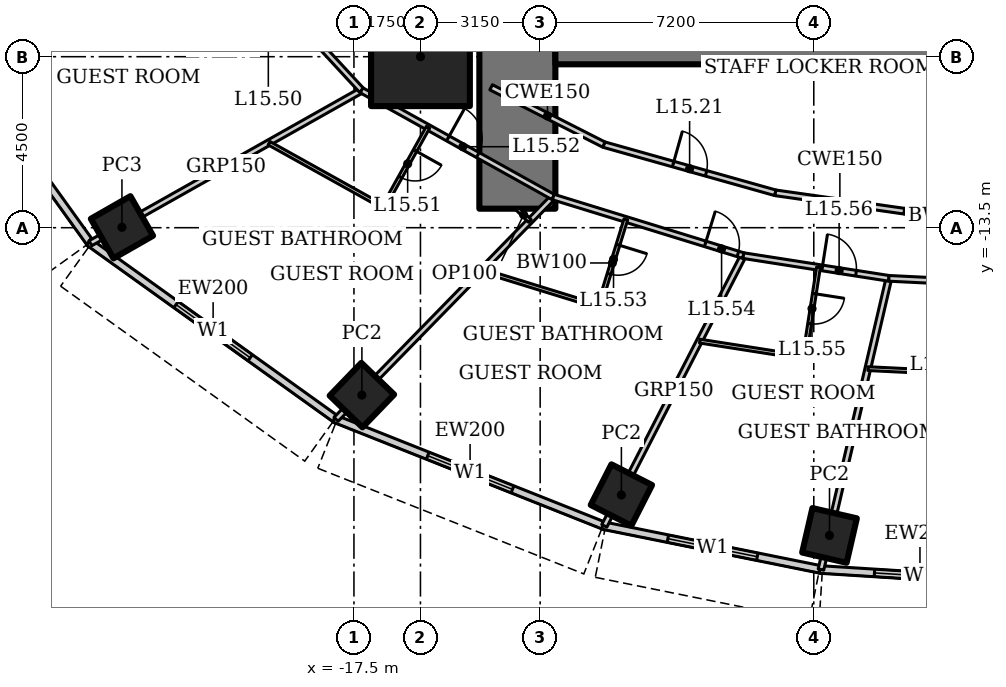
"""IFC4 building model, lengths in metres.
Left out: names, types, materials, properties, quantities, classifications, styles, units other than length and angle.
Written with IfcOpenShell. Run it as: python <this file> out.ifc"""

import sys

from ifc_helpers import new_model, si_unit, direction, frame, frame_2d, origin, origin_2d, place, context, subcontext, project, spatial, rectangle, hollow_rectangle, extrude, element, fill, save


model = new_model("IFC4")
c1 = context("Model", 3, precision=1e-05, world=origin(), true_north=direction((0.0, 1.0)))
c2 = subcontext(c1, "Body", "Model", "MODEL_VIEW")
j1 = project(units=[si_unit("LENGTHUNIT", "METRE"), si_unit("PLANEANGLEUNIT", "RADIAN")], contexts=[c1])
p1 = place(None, origin())
s1 = spatial("IfcSite", under=j1, at=p1, CompositionType="ELEMENT")
p2 = place(p1, origin())
s2 = spatial("IfcBuilding", under=s1, at=p2, CompositionType="ELEMENT")
p3 = place(p2, frame((0.0, 0.0, 69.4)))
s3 = spatial("IfcBuildingStorey", under=s2, at=p3, CompositionType="ELEMENT", Elevation=69.4)
p4 = place(p3, frame((-15.75, -9.0, 0.0), z_axis=(0.0, 0.0, 1.0), x_axis=(1.0, 0.0, 0.0)))
e1 = element("IfcColumn", 1, at=p4, inside=s3, PredefinedType="COLUMN", context=c2, shape_type="SweptSolid", body=[
    extrude(hollow_rectangle(XDim=2.6, YDim=2.6, WallThickness=0.13, at=origin_2d()), origin(), (0.0, 0.0, 1.0), 3.6),
])
p5 = place(p3, frame((-23.605, -13.489, 0.0), z_axis=(0.0, 0.0, 1.0), x_axis=(0.86824298017, 0.496139221777, 0.0)))
e2 = element("IfcColumn", 2, at=p5, inside=s3, PredefinedType="COLUMN", context=c2, shape_type="SweptSolid", body=[
    extrude(hollow_rectangle(XDim=1.2, YDim=1.2, WallThickness=0.12, at=origin_2d()), origin(), (0.0, 0.0, 1.0), 3.6),
])
for number, where, z_axis, x_axis in (
    (3, (-17.291, -17.905, 0.0), (0.0, 0.0, 1.0), (0.695, 0.719, 0.0)),
    (4, (-10.463, -20.534, 0.0), (0.0, 0.0, 1.0), (0.454, 0.891, 0.0)),
    (5, (-4.986, -21.598, 0.0), (0.0, 0.0, 1.0), (0.225, 0.974, 0.0)),
):
    element("IfcColumn", number, at=place(p3, frame(where, z_axis=z_axis, x_axis=x_axis)), inside=s3, PredefinedType="COLUMN", context=c2, shape_type="SweptSolid", body=[
        extrude(hollow_rectangle(XDim=1.2, YDim=1.2, WallThickness=0.1, at=origin_2d()), origin(), (0.0, 0.0, 1.0), 3.6),
    ])
p6 = place(p3, frame((-13.2, 13.0, 0.0), z_axis=(0.0, 0.0, 1.0), x_axis=(0.0, -1.0, 0.0)))
e6 = element("IfcWall", 6, at=p6, inside=s3, PredefinedType="SHEAR", context=c2, shape_type="SweptSolid", body=[
    extrude(rectangle(XDim=26.0, YDim=2.0, at=frame_2d((13.0, 0.0))), origin(), (0.0, 0.0, 1.0), 3.6),
])
p7 = place(p6, frame((12.1, 0.0, 0.0)))
e7 = element("IfcOpeningElement", 7, at=p7, cuts=e6, PredefinedType="OPENING", context=c2, shape_type="SweptSolid", body=[
    extrude(rectangle(XDim=1.8, YDim=2.1, at=frame_2d((0.9, 1.05))), frame((0.0, 1.01, 0.0), z_axis=(0.0, -1.0, 0.0), x_axis=(1.0, 0.0, 0.0)), (0.0, 0.0, 1.0), 2.02),
])
p8 = place(p3, frame((-12.2, -8.0, 0.0), z_axis=(0.0, 0.0, 1.0), x_axis=(1.0, 0.0, 0.0)))
e8 = element("IfcWall", 8, at=p8, inside=s3, PredefinedType="SHEAR", context=c2, shape_type="SweptSolid", body=[
    extrude(rectangle(XDim=24.4, YDim=2.4, at=frame_2d((12.2, 0.0))), origin(), (0.0, 0.0, 1.0), 3.6),
])
p9 = place(p3, frame((-29.26, -7.2, 0.0), z_axis=(0.0, 0.0, 1.0), x_axis=(0.583937613703, -0.811798536155, 0.0)))
e9 = element("IfcWall", 9, at=p9, inside=s3, PredefinedType="SOLIDWALL", context=c2, shape_type="SweptSolid", body=[
    extrude(rectangle(XDim=8.323, YDim=0.2, at=frame_2d((4.162, 0.0))), origin(), (0.0, 0.0, 1.0), 3.45),
])
p10 = place(p9, frame((2.961, 0.0, 0.5)))
e10 = element("IfcOpeningElement", 10, at=p10, cuts=e9, PredefinedType="OPENING", context=c2, shape_type="SweptSolid", body=[
    extrude(rectangle(XDim=2.4, YDim=2.2, at=frame_2d((1.2, 1.1))), frame((0.0, 0.11, 0.0), z_axis=(0.0, -1.0, 0.0), x_axis=(1.0, 0.0, 0.0)), (0.0, 0.0, 1.0), 0.22),
])
p11 = place(p3, frame((-24.482, -13.875, 0.0), z_axis=(0.0, 0.0, 1.0), x_axis=(0.812791321576, -0.582554948112, 0.0)))
e11 = element("IfcWall", 11, at=p11, inside=s3, PredefinedType="SOLIDWALL", context=c2, shape_type="SweptSolid", body=[
    extrude(rectangle(XDim=8.063, YDim=0.2, at=frame_2d((4.032, 0.0))), origin(), (0.0, 0.0, 1.0), 3.45),
])
p12 = place(p11, frame((2.832, 0.0, 0.5)))
e12 = element("IfcOpeningElement", 12, at=p12, cuts=e11, PredefinedType="OPENING", context=c2, shape_type="SweptSolid", body=[
    extrude(rectangle(XDim=2.4, YDim=2.2, at=frame_2d((1.2, 1.1))), frame((0.0, 0.11, 0.0), z_axis=(0.0, -1.0, 0.0), x_axis=(1.0, 0.0, 0.0)), (0.0, 0.0, 1.0), 0.22),
])
p13 = place(p3, frame((-18.018, -18.523, 0.0), z_axis=(0.0, 0.0, 1.0), x_axis=(0.929358351251, -0.369178892895, 0.0)))
e13 = element("IfcWall", 13, at=p13, inside=s3, PredefinedType="SOLIDWALL", context=c2, shape_type="SweptSolid", body=[
    extrude(rectangle(XDim=7.692, YDim=0.2, at=frame_2d((3.846, 0.0))), origin(), (0.0, 0.0, 1.0), 3.45),
])
p14 = place(p13, frame((2.646, 0.0, 0.5)))
e14 = element("IfcOpeningElement", 14, at=p14, cuts=e13, PredefinedType="OPENING", context=c2, shape_type="SweptSolid", body=[
    extrude(rectangle(XDim=2.4, YDim=2.2, at=frame_2d((1.2, 1.1))), frame((0.0, 0.11, 0.0), z_axis=(0.0, -1.0, 0.0), x_axis=(1.0, 0.0, 0.0)), (0.0, 0.0, 1.0), 0.22),
])
p15 = place(p3, frame((-10.957, -21.337, 0.0), z_axis=(0.0, 0.0, 1.0), x_axis=(0.980251657452, -0.197754110105, 0.0)))
e15 = element("IfcWall", 15, at=p15, inside=s3, PredefinedType="SOLIDWALL", context=c2, shape_type="SweptSolid", body=[
    extrude(rectangle(XDim=5.904, YDim=0.2, at=frame_2d((2.952, 0.0))), origin(), (0.0, 0.0, 1.0), 3.45),
])
p16 = place(p15, frame((1.752, 0.0, 0.5)))
e16 = element("IfcOpeningElement", 16, at=p16, cuts=e15, PredefinedType="OPENING", context=c2, shape_type="SweptSolid", body=[
    extrude(rectangle(XDim=2.4, YDim=2.2, at=frame_2d((1.2, 1.1))), frame((0.0, 0.11, 0.0), z_axis=(0.0, -1.0, 0.0), x_axis=(1.0, 0.0, 0.0)), (0.0, 0.0, 1.0), 0.22),
])
p17 = place(p3, frame((-5.253, -22.493, 0.0), z_axis=(0.0, 0.0, 1.0), x_axis=(0.998018582375, -0.062919863585, 0.0)))
e17 = element("IfcWall", 17, at=p17, inside=s3, PredefinedType="SOLIDWALL", context=c2, shape_type="SweptSolid", body=[
    extrude(rectangle(XDim=5.304, YDim=0.2, at=frame_2d((2.652, 0.0))), origin(), (0.0, 0.0, 1.0), 3.45),
])
p18 = place(p17, frame((1.452, 0.0, 0.5)))
e18 = element("IfcOpeningElement", 18, at=p18, cuts=e17, PredefinedType="OPENING", context=c2, shape_type="SweptSolid", body=[
    extrude(rectangle(XDim=2.4, YDim=2.2, at=frame_2d((1.2, 1.1))), frame((0.0, 0.11, 0.0), z_axis=(0.0, -1.0, 0.0), x_axis=(1.0, 0.0, 0.0)), (0.0, 0.0, 1.0), 0.22),
])
p19 = place(p3, frame((-24.435, -13.909, 0.0), z_axis=(0.0, 0.0, 1.0), x_axis=(0.871075246657, 0.491149584813, 0.0)))
e19 = element("IfcWall", 19, at=p19, inside=s3, PredefinedType="PARTITIONING", context=c2, shape_type="SweptSolid", body=[
    extrude(rectangle(XDim=8.192, YDim=0.15, at=frame_2d((4.096, 0.0))), origin(), (0.0, 0.0, 1.0), 2.693),
])
p20 = place(p3, frame((-17.97, -18.542, 0.0), z_axis=(0.0, 0.0, 1.0), x_axis=(0.698757291878, 0.715358823981, 0.0)))
e20 = element("IfcWall", 20, at=p20, inside=s3, PredefinedType="PARTITIONING", context=c2, shape_type="SweptSolid", body=[
    extrude(rectangle(XDim=8.177, YDim=0.15, at=frame_2d((4.088, 0.0))), origin(), (0.0, 0.0, 1.0), 2.528),
])
p21 = place(p3, frame((-10.912, -21.346, 0.0), z_axis=(0.0, 0.0, 1.0), x_axis=(0.45752665959, 0.889195904042, 0.0)))
e21 = element("IfcWall", 21, at=p21, inside=s3, PredefinedType="PARTITIONING", context=c2, shape_type="SweptSolid", body=[
    extrude(rectangle(XDim=7.997, YDim=0.15, at=frame_2d((3.999, 0.0))), origin(), (0.0, 0.0, 1.0), 2.528),
])
p22 = place(p3, frame((-5.211, -22.496, 0.0), z_axis=(0.0, 0.0, 1.0), x_axis=(0.227056984461, 0.973881474209, 0.0)))
e22 = element("IfcWall", 22, at=p22, inside=s3, PredefinedType="PARTITIONING", context=c2, shape_type="SweptSolid", body=[
    extrude(rectangle(XDim=7.869, YDim=0.15, at=frame_2d((3.934, 0.0))), origin(), (0.0, 0.0, 1.0), 2.767),
])
p23 = place(p3, frame((-21.484, -5.356, 0.0), z_axis=(0.0, 0.0, 1.0), x_axis=(0.678641806296, -0.734469399463, 0.0)))
e23 = element("IfcWall", 23, at=p23, inside=s3, PredefinedType="PARTITIONING", context=c2, shape_type="SweptSolid", body=[
    extrude(rectangle(XDim=6.166, YDim=0.15, at=frame_2d((3.083, 0.0))), origin(), (0.0, 0.0, 1.0), 3.45),
])
p24 = place(p23, frame((2.1, 0.0, 0.0)))
e24 = element("IfcOpeningElement", 24, at=p24, cuts=e23, PredefinedType="OPENING", context=c2, shape_type="SweptSolid", body=[
    extrude(rectangle(XDim=0.9, YDim=2.1, at=frame_2d((0.45, 1.05))), frame((0.0, 0.085, 0.0), z_axis=(0.0, -1.0, 0.0), x_axis=(1.0, 0.0, 0.0)), (0.0, 0.0, 1.0), 0.17),
])
p25 = place(p3, frame((-17.299, -9.885, 0.0), z_axis=(0.0, 0.0, 1.0), x_axis=(0.873695910579, -0.486472461541, 0.0)))
e25 = element("IfcWall", 25, at=p25, inside=s3, PredefinedType="PARTITIONING", context=c2, shape_type="SweptSolid", body=[
    extrude(rectangle(XDim=5.771, YDim=0.15, at=frame_2d((2.885, 0.0))), origin(), (0.0, 0.0, 1.0), 3.45),
])
p26 = place(p25, frame((2.6, 0.0, 0.0)))
e26 = element("IfcOpeningElement", 26, at=p26, cuts=e25, PredefinedType="OPENING", context=c2, shape_type="SweptSolid", body=[
    extrude(rectangle(XDim=0.9, YDim=2.1, at=frame_2d((0.45, 1.05))), frame((0.0, 0.085, 0.0), z_axis=(0.0, -1.0, 0.0), x_axis=(1.0, 0.0, 0.0)), (0.0, 0.0, 1.0), 0.17),
])
p27 = place(p3, frame((-12.257, -12.693, 0.0), z_axis=(0.0, 0.0, 1.0), x_axis=(0.955657956744, -0.294478980085, 0.0)))
e27 = element("IfcWall", 27, at=p27, inside=s3, PredefinedType="PARTITIONING", context=c2, shape_type="SweptSolid", body=[
    extrude(rectangle(XDim=5.236, YDim=0.15, at=frame_2d((2.618, 0.0))), origin(), (0.0, 0.0, 1.0), 3.45),
])
p28 = place(p27, frame((4.186, 0.0, 0.0)))
e28 = element("IfcOpeningElement", 28, at=p28, cuts=e27, PredefinedType="OPENING", context=c2, shape_type="SweptSolid", body=[
    extrude(rectangle(XDim=0.9, YDim=2.1, at=frame_2d((0.45, 1.05))), frame((0.0, 0.085, 0.0), z_axis=(0.0, -1.0, 0.0), x_axis=(1.0, 0.0, 0.0)), (0.0, 0.0, 1.0), 0.17),
])
p29 = place(p3, frame((-7.253, -14.235, 0.0), z_axis=(0.0, 0.0, 1.0), x_axis=(0.988015036573, -0.154357660987, 0.0)))
e29 = element("IfcWall", 29, at=p29, inside=s3, PredefinedType="PARTITIONING", context=c2, shape_type="SweptSolid", body=[
    extrude(rectangle(XDim=3.875, YDim=0.15, at=frame_2d((1.938, 0.0))), origin(), (0.0, 0.0, 1.0), 3.45),
])
p30 = place(p29, frame((2.1, 0.0, 0.0)))
e30 = element("IfcOpeningElement", 30, at=p30, cuts=e29, PredefinedType="OPENING", context=c2, shape_type="SweptSolid", body=[
    extrude(rectangle(XDim=0.9, YDim=2.1, at=frame_2d((0.45, 1.05))), frame((0.0, 0.085, 0.0), z_axis=(0.0, -1.0, 0.0), x_axis=(1.0, 0.0, 0.0)), (0.0, 0.0, 1.0), 0.17),
])
p31 = place(p3, frame((-3.424, -14.833, 0.0), z_axis=(0.0, 0.0, 1.0), x_axis=(0.998809560203, -0.048779733975, 0.0)))
e31 = element("IfcWall", 31, at=p31, inside=s3, PredefinedType="PARTITIONING", context=c2, shape_type="SweptSolid", body=[
    extrude(rectangle(XDim=3.428, YDim=0.15, at=frame_2d((1.714, 0.0))), origin(), (0.0, 0.0, 1.0), 3.45),
])
p32 = place(p31, frame((1.6, 0.0, 0.0)))
e32 = element("IfcOpeningElement", 32, at=p32, cuts=e31, PredefinedType="OPENING", context=c2, shape_type="SweptSolid", body=[
    extrude(rectangle(XDim=0.9, YDim=2.1, at=frame_2d((0.45, 1.05))), frame((0.0, 0.085, 0.0), z_axis=(0.0, -1.0, 0.0), x_axis=(1.0, 0.0, 0.0)), (0.0, 0.0, 1.0), 0.17),
])
p33 = place(p3, frame((-10.924, -11.312, 0.0), z_axis=(0.0, 0.0, 1.0), x_axis=(0.962643729928, -0.270771211967, 0.0)))
e33 = element("IfcWall", 33, at=p33, inside=s3, PredefinedType="PARTITIONING", context=c2, shape_type="SweptSolid", body=[
    extrude(rectangle(XDim=4.688, YDim=0.15, at=frame_2d((2.344, 0.0))), origin(), (0.0, 0.0, 1.0), 3.45),
])
p34 = place(p33, frame((1.894, 0.0, 0.0)))
e34 = element("IfcOpeningElement", 34, at=p34, cuts=e33, PredefinedType="OPENING", context=c2, shape_type="SweptSolid", body=[
    extrude(rectangle(XDim=0.9, YDim=2.1, at=frame_2d((0.45, 1.05))), frame((0.0, 0.085, 0.0), z_axis=(0.0, -1.0, 0.0), x_axis=(1.0, 0.0, 0.0)), (0.0, 0.0, 1.0), 0.17),
])
p35 = place(p3, frame((-6.411, -12.582, 0.0), z_axis=(0.0, 0.0, 1.0), x_axis=(0.990002114939, -0.14105251652, 0.0)))
e35 = element("IfcWall", 35, at=p35, inside=s3, PredefinedType="PARTITIONING", context=c2, shape_type="SweptSolid", body=[
    extrude(rectangle(XDim=3.429, YDim=0.15, at=frame_2d((1.714, 0.0))), origin(), (0.0, 0.0, 1.0), 3.45),
])
p36 = place(p3, frame((-15.552, -10.858, 0.0), z_axis=(0.0, 0.0, 1.0), x_axis=(-0.486445964861, -0.873710663361, 0.0)))
e36 = element("IfcWall", 36, at=p36, inside=s3, PredefinedType="PARTITIONING", context=c2, shape_type="SweptSolid", body=[
    extrude(rectangle(XDim=2.4, YDim=0.1, at=frame_2d((1.2, 0.0))), origin(), (0.0, 0.0, 1.0), 3.45),
])
p37 = place(p36, frame((0.7, 0.0, 0.0)))
e37 = element("IfcOpeningElement", 37, at=p37, cuts=e36, PredefinedType="OPENING", context=c2, shape_type="SweptSolid", body=[
    extrude(rectangle(XDim=0.8, YDim=2.1, at=frame_2d((0.4, 1.05))), frame((0.0, 0.06, 0.0), z_axis=(0.0, -1.0, 0.0), x_axis=(1.0, 0.0, 0.0)), (0.0, 0.0, 1.0), 0.12),
])
p38 = place(p3, frame((-16.719, -12.955, 0.0), z_axis=(0.0, 0.0, 1.0), x_axis=(-0.873676251648, 0.486507766953, 0.0)))
e38 = element("IfcWall", 38, at=p38, inside=s3, PredefinedType="PARTITIONING", context=c2, shape_type="SweptSolid", body=[
    extrude(rectangle(XDim=3.45, YDim=0.1, at=frame_2d((1.725, 0.0))), origin(), (0.0, 0.0, 1.0), 3.45),
])
p39 = place(p3, frame((-10.346, -13.281, 0.0), z_axis=(0.0, 0.0, 1.0), x_axis=(-0.294478957423, -0.955657963727, 0.0)))
e39 = element("IfcWall", 39, at=p39, inside=s3, PredefinedType="PARTITIONING", context=c2, shape_type="SweptSolid", body=[
    extrude(rectangle(XDim=2.4, YDim=0.1, at=frame_2d((1.2, 0.0))), origin(), (0.0, 0.0, 1.0), 3.45),
])
p40 = place(p39, frame((0.7, 0.0, 0.0)))
e40 = element("IfcOpeningElement", 40, at=p40, cuts=e39, PredefinedType="OPENING", context=c2, shape_type="SweptSolid", body=[
    extrude(rectangle(XDim=0.8, YDim=2.1, at=frame_2d((0.4, 1.05))), frame((0.0, 0.06, 0.0), z_axis=(0.0, -1.0, 0.0), x_axis=(1.0, 0.0, 0.0)), (0.0, 0.0, 1.0), 0.12),
])
p41 = place(p3, frame((-11.052, -15.575, 0.0), z_axis=(0.0, 0.0, 1.0), x_axis=(-0.955641033268, 0.294533895391, 0.0)))
e41 = element("IfcWall", 41, at=p41, inside=s3, PredefinedType="PARTITIONING", context=c2, shape_type="SweptSolid", body=[
    extrude(rectangle(XDim=3.216, YDim=0.1, at=frame_2d((1.608, 0.0))), origin(), (0.0, 0.0, 1.0), 3.45),
])
p42 = place(p3, frame((-5.277, -14.543, 0.0), z_axis=(0.0, 0.0, 1.0), x_axis=(-0.154426532979, -0.988004274238, 0.0)))
e42 = element("IfcWall", 42, at=p42, inside=s3, PredefinedType="PARTITIONING", context=c2, shape_type="SweptSolid", body=[
    extrude(rectangle(XDim=2.4, YDim=0.1, at=frame_2d((1.2, 0.0))), origin(), (0.0, 0.0, 1.0), 3.45),
])
p43 = place(p42, frame((0.7, 0.0, 0.0)))
e43 = element("IfcOpeningElement", 43, at=p43, cuts=e42, PredefinedType="OPENING", context=c2, shape_type="SweptSolid", body=[
    extrude(rectangle(XDim=0.8, YDim=2.1, at=frame_2d((0.4, 1.05))), frame((0.0, 0.06, 0.0), z_axis=(0.0, -1.0, 0.0), x_axis=(1.0, 0.0, 0.0)), (0.0, 0.0, 1.0), 0.12),
])
p44 = place(p3, frame((-5.647, -16.915, 0.0), z_axis=(0.0, 0.0, 1.0), x_axis=(-0.988015375833, 0.154355489429, 0.0)))
e44 = element("IfcWall", 44, at=p44, inside=s3, PredefinedType="PARTITIONING", context=c2, shape_type="SweptSolid", body=[
    extrude(rectangle(XDim=2.785, YDim=0.1, at=frame_2d((1.393, 0.0))), origin(), (0.0, 0.0, 1.0), 3.45),
])
p45 = place(p3, frame((-2.043, -17.303, 0.0), z_axis=(0.0, 0.0, 1.0), x_axis=(-0.998809649749, 0.048777900405, 0.0)))
e45 = element("IfcWall", 45, at=p45, inside=s3, PredefinedType="PARTITIONING", context=c2, shape_type="SweptSolid", body=[
    extrude(rectangle(XDim=1.932, YDim=0.1, at=frame_2d((0.966, 0.0))), origin(), (0.0, 0.0, 1.0), 3.45),
])
p46 = place(p3, frame((-13.2, -13.0, 0.0), z_axis=(0.0, 0.0, 1.0), x_axis=(0.715289751842, -0.698827998087, 0.0)))
e46 = element("IfcWall", 46, at=p46, inside=s3, PredefinedType="PARTITIONING", context=c2, shape_type="SweptSolid", body=[
    extrude(rectangle(XDim=0.46, YDim=0.1, at=frame_2d((0.23, 0.0))), origin(), (0.0, 0.0, 1.0), 3.45),
])
p47 = place(p3, frame((-13.89, -9.805, 0.0), z_axis=(0.0, 0.0, 1.0), x_axis=(0.891398195277, -0.453220980821, 0.0)))
e47 = element("IfcWall", 47, at=p47, inside=s3, PredefinedType="PARTITIONING", context=c2, shape_type="SweptSolid", body=[
    extrude(rectangle(XDim=3.327, YDim=0.15, at=frame_2d((1.664, 0.0))), origin(), (0.0, 0.0, 1.0), 3.45),
])
p48 = place(p3, frame((-3.016, -13.066, 0.0), z_axis=(0.0, 0.0, 1.0), x_axis=(0.999010128674, -0.044483286824, 0.0)))
e48 = element("IfcWall", 48, at=p48, inside=s3, PredefinedType="PARTITIONING", context=c2, shape_type="SweptSolid", body=[
    extrude(rectangle(XDim=0.982, YDim=0.15, at=frame_2d((0.491, 0.0))), origin(), (0.0, 0.0, 1.0), 3.45),
])
p49 = place(p12, origin())
e49 = element("IfcWindow", 49, at=p49, inside=s3, PartitioningType="SINGLE_PANEL", PredefinedType="WINDOW", context=c2, shape_type="SweptSolid", body=[
    extrude(rectangle(XDim=2.4, YDim=2.2, at=frame_2d((1.2, 1.1))), frame((0.0, 0.03, 0.0), z_axis=(0.0, -1.0, 0.0), x_axis=(1.0, 0.0, 0.0)), (0.0, 0.0, 1.0), 0.06),
])
fill(e12, e49)
p50 = place(p14, origin())
e50 = element("IfcWindow", 50, at=p50, inside=s3, PartitioningType="SINGLE_PANEL", PredefinedType="WINDOW", context=c2, shape_type="SweptSolid", body=[
    extrude(rectangle(XDim=2.4, YDim=2.2, at=frame_2d((1.2, 1.1))), frame((0.0, 0.03, 0.0), z_axis=(0.0, -1.0, 0.0), x_axis=(1.0, 0.0, 0.0)), (0.0, 0.0, 1.0), 0.06),
])
fill(e14, e50)
p51 = place(p16, origin())
e51 = element("IfcWindow", 51, at=p51, inside=s3, PartitioningType="SINGLE_PANEL", PredefinedType="WINDOW", context=c2, shape_type="SweptSolid", body=[
    extrude(rectangle(XDim=2.4, YDim=2.2, at=frame_2d((1.2, 1.1))), frame((0.0, 0.03, 0.0), z_axis=(0.0, -1.0, 0.0), x_axis=(1.0, 0.0, 0.0)), (0.0, 0.0, 1.0), 0.06),
])
fill(e16, e51)
p52 = place(p18, origin())
e52 = element("IfcWindow", 52, at=p52, inside=s3, PartitioningType="SINGLE_PANEL", PredefinedType="WINDOW", context=c2, shape_type="SweptSolid", body=[
    extrude(rectangle(XDim=2.4, YDim=2.2, at=frame_2d((1.2, 1.1))), frame((0.0, 0.03, 0.0), z_axis=(0.0, -1.0, 0.0), x_axis=(1.0, 0.0, 0.0)), (0.0, 0.0, 1.0), 0.06),
])
fill(e18, e52)
p53 = place(p34, origin())
e53 = element("IfcDoor", 53, at=p53, inside=s3, OperationType="SINGLE_SWING_LEFT", PredefinedType="DOOR", context=c2, shape_type="SweptSolid", body=[
    extrude(rectangle(XDim=0.9, YDim=2.1, at=frame_2d((0.45, 1.05))), frame((0.0, 0.025, 0.0), z_axis=(0.0, -1.0, 0.0), x_axis=(1.0, 0.0, 0.0)), (0.0, 0.0, 1.0), 0.05),
])
fill(e34, e53)
p54 = place(p37, origin())
e54 = element("IfcDoor", 54, at=p54, inside=s3, OperationType="SINGLE_SWING_LEFT", PredefinedType="DOOR", context=c2, shape_type="SweptSolid", body=[
    extrude(rectangle(XDim=0.8, YDim=2.1, at=frame_2d((0.4, 1.05))), frame((0.0, 0.025, 0.0), z_axis=(0.0, -1.0, 0.0), x_axis=(1.0, 0.0, 0.0)), (0.0, 0.0, 1.0), 0.05),
])
fill(e37, e54)
p55 = place(p26, origin())
e55 = element("IfcDoor", 55, at=p55, inside=s3, OperationType="SINGLE_SWING_LEFT", PredefinedType="DOOR", context=c2, shape_type="SweptSolid", body=[
    extrude(rectangle(XDim=0.9, YDim=2.1, at=frame_2d((0.45, 1.05))), frame((0.0, 0.025, 0.0), z_axis=(0.0, -1.0, 0.0), x_axis=(1.0, 0.0, 0.0)), (0.0, 0.0, 1.0), 0.05),
])
fill(e26, e55)
p56 = place(p40, origin())
e56 = element("IfcDoor", 56, at=p56, inside=s3, OperationType="SINGLE_SWING_LEFT", PredefinedType="DOOR", context=c2, shape_type="SweptSolid", body=[
    extrude(rectangle(XDim=0.8, YDim=2.1, at=frame_2d((0.4, 1.05))), frame((0.0, 0.025, 0.0), z_axis=(0.0, -1.0, 0.0), x_axis=(1.0, 0.0, 0.0)), (0.0, 0.0, 1.0), 0.05),
])
fill(e40, e56)
p57 = place(p28, origin())
e57 = element("IfcDoor", 57, at=p57, inside=s3, OperationType="SINGLE_SWING_LEFT", PredefinedType="DOOR", context=c2, shape_type="SweptSolid", body=[
    extrude(rectangle(XDim=0.9, YDim=2.1, at=frame_2d((0.45, 1.05))), frame((0.0, 0.025, 0.0), z_axis=(0.0, -1.0, 0.0), x_axis=(1.0, 0.0, 0.0)), (0.0, 0.0, 1.0), 0.05),
])
fill(e28, e57)
p58 = place(p43, origin())
e58 = element("IfcDoor", 58, at=p58, inside=s3, OperationType="SINGLE_SWING_LEFT", PredefinedType="DOOR", context=c2, shape_type="SweptSolid", body=[
    extrude(rectangle(XDim=0.8, YDim=2.1, at=frame_2d((0.4, 1.05))), frame((0.0, 0.025, 0.0), z_axis=(0.0, -1.0, 0.0), x_axis=(1.0, 0.0, 0.0)), (0.0, 0.0, 1.0), 0.05),
])
fill(e43, e58)
p59 = place(p30, origin())
e59 = element("IfcDoor", 59, at=p59, inside=s3, OperationType="SINGLE_SWING_LEFT", PredefinedType="DOOR", context=c2, shape_type="SweptSolid", body=[
    extrude(rectangle(XDim=0.9, YDim=2.1, at=frame_2d((0.45, 1.05))), frame((0.0, 0.025, 0.0), z_axis=(0.0, -1.0, 0.0), x_axis=(1.0, 0.0, 0.0)), (0.0, 0.0, 1.0), 0.05),
])
fill(e30, e59)
save(model, sys.argv[1])
